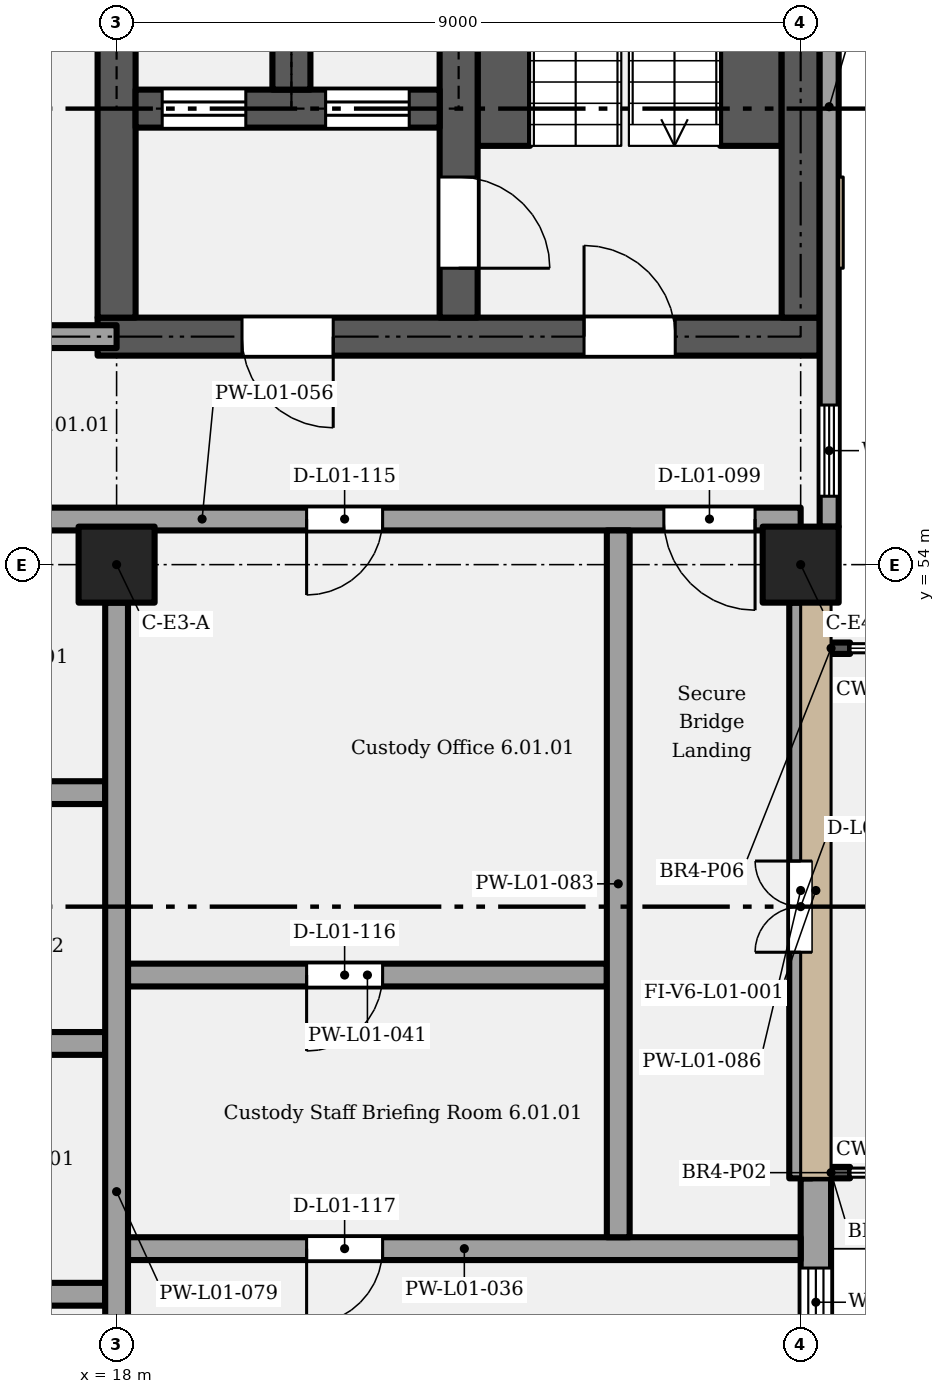
"""IFC4 building model, lengths in metres.
Left out: names, types, materials, properties, quantities, classifications, styles, units other than length and angle.
Written with IfcOpenShell. Run it as: python <this file> out.ifc"""

import sys

from ifc_helpers import new_model, si_unit, direction, frame, frame_2d, origin, origin_2d, place, context, subcontext, project, spatial, rectangle, extrude, element, fill, save


model = new_model("IFC4")
c1 = context("Model", 3, precision=1e-05, world=origin(), true_north=direction((0.0, 1.0)))
c2 = subcontext(c1, "Body", "Model", "MODEL_VIEW")
j1 = project(units=[si_unit("LENGTHUNIT", "METRE"), si_unit("PLANEANGLEUNIT", "RADIAN")], contexts=[c1])
p1 = place(None, origin())
s1 = spatial("IfcSite", under=j1, at=p1, CompositionType="ELEMENT")
p2 = place(p1, origin())
s2 = spatial("IfcBuilding", under=s1, at=p2, CompositionType="ELEMENT")
p3 = place(p2, frame((0.0, 0.0, 6.6)))
s3 = spatial("IfcBuildingStorey", under=s2, at=p3, CompositionType="ELEMENT", Elevation=6.6)
for number, where, z_axis, x_axis in (
    (1, (18.0, 54.0, 0.0), (0.0, 0.0, 1.0), (1.0, 0.0, 0.0)),
    (2, (27.0, 54.0, 0.0), (0.0, 0.0, 1.0), (1.0, 0.0, 0.0)),
):
    element("IfcColumn", number, at=place(p3, frame(where, z_axis=z_axis, x_axis=x_axis)), inside=s3, PredefinedType="COLUMN", context=c2, shape_type="SweptSolid", body=[
        extrude(rectangle(XDim=1.0, YDim=1.0, at=origin_2d()), origin(), (0.0, 0.0, 1.0), 5.4),
    ])
p4 = place(p3, frame((17.75, 57.0, 0.0), z_axis=(0.0, 0.0, 1.0), x_axis=(1.0, 0.0, 0.0)))
e3 = element("IfcWall", 3, at=p4, inside=s3, PredefinedType="SHEAR", context=c2, shape_type="SweptSolid", body=[
    extrude(rectangle(XDim=9.5, YDim=0.5, at=frame_2d((4.75, 0.0))), origin(), (0.0, 0.0, 1.0), 5.1),
])
p5 = place(p4, frame((3.1, 0.0, 0.0), z_axis=(0.0, 0.0, 1.0), x_axis=(-1.0, 0.0, 0.0)))
e4 = element("IfcOpeningElement", 4, at=p5, cuts=e3, PredefinedType="OPENING", context=c2, shape_type="SweptSolid", body=[
    extrude(rectangle(XDim=1.2, YDim=2.1, at=frame_2d((0.6, 1.05))), frame((0.0, 0.26, 0.0), z_axis=(0.0, -1.0, 0.0), x_axis=(1.0, 0.0, 0.0)), (0.0, 0.0, 1.0), 0.52),
])
p6 = place(p4, frame((6.4, 0.0, 0.0)))
e5 = element("IfcOpeningElement", 5, at=p6, cuts=e3, PredefinedType="OPENING", context=c2, shape_type="SweptSolid", body=[
    extrude(rectangle(XDim=1.2, YDim=2.1, at=frame_2d((0.6, 1.05))), frame((0.0, 0.26, 0.0), z_axis=(0.0, -1.0, 0.0), x_axis=(1.0, 0.0, 0.0)), (0.0, 0.0, 1.0), 0.52),
])
p7 = place(p3, frame((18.0, 57.25, 0.0), z_axis=(0.0, 0.0, 1.0), x_axis=(0.0, 1.0, 0.0)))
e6 = element("IfcWall", 6, at=p7, inside=s3, PredefinedType="SHEAR", context=c2, shape_type="SweptSolid", body=[
    extrude(rectangle(XDim=8.3, YDim=0.5, at=frame_2d((4.15, 0.0))), origin(), (0.0, 0.0, 1.0), 5.1),
])
p8 = place(p3, frame((22.5, 57.25, 0.0), z_axis=(0.0, 0.0, 1.0), x_axis=(0.0, 1.0, 0.0)))
e7 = element("IfcWall", 7, at=p8, inside=s3, PredefinedType="SHEAR", context=c2, shape_type="SweptSolid", body=[
    extrude(rectangle(XDim=8.5, YDim=0.5, at=frame_2d((4.25, 0.0))), origin(), (0.0, 0.0, 1.0), 5.1),
])
p9 = place(p8, frame((1.85, 0.0, 0.0), z_axis=(0.0, 0.0, 1.0), x_axis=(-1.0, 0.0, 0.0)))
e8 = element("IfcOpeningElement", 8, at=p9, cuts=e7, PredefinedType="OPENING", context=c2, shape_type="SweptSolid", body=[
    extrude(rectangle(XDim=1.2, YDim=2.1, at=frame_2d((0.6, 1.05))), frame((0.0, 0.26, 0.0), z_axis=(0.0, -1.0, 0.0), x_axis=(1.0, 0.0, 0.0)), (0.0, 0.0, 1.0), 0.52),
])
p10 = place(p3, frame((27.0, 57.25, 0.0), z_axis=(0.0, 0.0, 1.0), x_axis=(0.0, 1.0, 0.0)))
e9 = element("IfcWall", 9, at=p10, inside=s3, PredefinedType="SHEAR", context=c2, shape_type="SweptSolid", body=[
    extrude(rectangle(XDim=8.3, YDim=0.5, at=frame_2d((4.15, 0.0))), origin(), (0.0, 0.0, 1.0), 5.1),
])
p11 = place(p3, frame((18.25, 60.0, 0.0), z_axis=(0.0, 0.0, 1.0), x_axis=(1.0, 0.0, 0.0)))
e10 = element("IfcWall", 10, at=p11, inside=s3, PredefinedType="SHEAR", context=c2, shape_type="SweptSolid", body=[
    extrude(rectangle(XDim=4.0, YDim=0.5, at=frame_2d((2.0, 0.0))), origin(), (0.0, 0.0, 1.0), 5.1),
])
p12 = place(p11, frame((0.35, 0.0, 0.0)))
e11 = element("IfcOpeningElement", 11, at=p12, cuts=e10, PredefinedType="OPENING", context=c2, shape_type="SweptSolid", body=[
    extrude(rectangle(XDim=1.1, YDim=2.1, at=frame_2d((0.55, 1.05))), frame((0.0, 0.26, 0.0), z_axis=(0.0, -1.0, 0.0), x_axis=(1.0, 0.0, 0.0)), (0.0, 0.0, 1.0), 0.52),
])
p13 = place(p11, frame((2.5, 0.0, 0.0)))
e12 = element("IfcOpeningElement", 12, at=p13, cuts=e10, PredefinedType="OPENING", context=c2, shape_type="SweptSolid", body=[
    extrude(rectangle(XDim=1.1, YDim=2.1, at=frame_2d((0.55, 1.05))), frame((0.0, 0.26, 0.0), z_axis=(0.0, -1.0, 0.0), x_axis=(1.0, 0.0, 0.0)), (0.0, 0.0, 1.0), 0.52),
])
p14 = place(p3, frame((20.3, 60.25, 0.0), z_axis=(0.0, 0.0, 1.0), x_axis=(0.0, 1.0, 0.0)))
e13 = element("IfcWall", 13, at=p14, inside=s3, PredefinedType="SHEAR", context=c2, shape_type="SweptSolid", body=[
    extrude(rectangle(XDim=5.5, YDim=0.5, at=frame_2d((2.75, 0.0))), origin(), (0.0, 0.0, 1.0), 5.1),
])
p15 = place(p3, frame((27.2, 38.0, 0.0), z_axis=(0.0, 0.0, 1.0), x_axis=(0.0, 1.0, 0.0)))
e14 = element("IfcWall", 14, at=p15, inside=s3, PredefinedType="SOLIDWALL", context=c2, shape_type="SweptSolid", body=[
    extrude(rectangle(XDim=7.925, YDim=0.4, at=frame_2d((3.962, 0.0))), origin(), (0.0, 0.0, 1.0), 5.1),
])
p16 = place(p15, frame((0.425, 0.0, 1.5)))
e15 = element("IfcOpeningElement", 15, at=p16, cuts=e14, PredefinedType="OPENING", context=c2, shape_type="SweptSolid", body=[
    extrude(rectangle(XDim=0.9, YDim=1.8, at=frame_2d((0.45, 0.9))), frame((0.0, 0.21, 0.0), z_axis=(0.0, -1.0, 0.0), x_axis=(1.0, 0.0, 0.0)), (0.0, 0.0, 1.0), 0.42),
])
p17 = place(p15, frame((3.175, 0.0, 1.5)))
e16 = element("IfcOpeningElement", 16, at=p17, cuts=e14, PredefinedType="OPENING", context=c2, shape_type="SweptSolid", body=[
    extrude(rectangle(XDim=0.9, YDim=1.8, at=frame_2d((0.45, 0.9))), frame((0.0, 0.21, 0.0), z_axis=(0.0, -1.0, 0.0), x_axis=(1.0, 0.0, 0.0)), (0.0, 0.0, 1.0), 0.42),
])
p18 = place(p15, frame((5.845, 0.0, 1.5)))
e17 = element("IfcOpeningElement", 17, at=p18, cuts=e14, PredefinedType="OPENING", context=c2, shape_type="SweptSolid", body=[
    extrude(rectangle(XDim=0.9, YDim=1.8, at=frame_2d((0.45, 0.9))), frame((0.0, 0.21, 0.0), z_axis=(0.0, -1.0, 0.0), x_axis=(1.0, 0.0, 0.0)), (0.0, 0.0, 1.0), 0.42),
])
p19 = place(p3, frame((27.375, 54.5, 0.0), z_axis=(0.0, 0.0, 1.0), x_axis=(0.0, 1.0, 0.0)))
e18 = element("IfcWall", 18, at=p19, inside=s3, PredefinedType="SOLIDWALL", context=c2, shape_type="SweptSolid", body=[
    extrude(rectangle(XDim=11.05, YDim=0.25, at=frame_2d((5.525, 0.0))), origin(), (0.0, 0.0, 1.0), 5.1),
])
p20 = place(p19, frame((0.4, 0.0, 0.9)))
e19 = element("IfcOpeningElement", 19, at=p20, cuts=e18, PredefinedType="OPENING", context=c2, shape_type="SweptSolid", body=[
    extrude(rectangle(XDim=1.2, YDim=2.4, at=frame_2d((0.6, 1.2))), frame((0.0, 0.135, 0.0), z_axis=(0.0, -1.0, 0.0), x_axis=(1.0, 0.0, 0.0)), (0.0, 0.0, 1.0), 0.27),
])
p21 = place(p3, frame((11.55, 44.4, 0.0), z_axis=(0.0, 0.0, 1.0), x_axis=(1.0, 0.0, 0.0)))
e20 = element("IfcWall", 20, at=p21, inside=s3, PredefinedType="PARTITIONING", context=c2, shape_type="SweptSolid", body=[
    extrude(rectangle(XDim=6.3, YDim=0.3, at=frame_2d((3.15, 0.0))), origin(), (0.0, 0.0, 1.0), 5.1),
])
p22 = place(p3, frame((18.15, 45.0, 0.0), z_axis=(0.0, 0.0, 1.0), x_axis=(1.0, 0.0, 0.0)))
e21 = element("IfcWall", 21, at=p22, inside=s3, PredefinedType="PARTITIONING", context=c2, shape_type="SweptSolid", body=[
    extrude(rectangle(XDim=8.85, YDim=0.3, at=frame_2d((4.425, 0.0))), origin(), (0.0, 0.0, 1.0), 5.1),
])
p23 = place(p22, frame((3.35, 0.0, 0.0), z_axis=(0.0, 0.0, 1.0), x_axis=(-1.0, 0.0, 0.0)))
e22 = element("IfcOpeningElement", 22, at=p23, cuts=e21, PredefinedType="OPENING", context=c2, shape_type="SweptSolid", body=[
    extrude(rectangle(XDim=1.0, YDim=2.1, at=frame_2d((0.5, 1.05))), frame((0.0, 0.16, 0.0), z_axis=(0.0, -1.0, 0.0), x_axis=(1.0, 0.0, 0.0)), (0.0, 0.0, 1.0), 0.32),
])
p24 = place(p3, frame((11.55, 47.7, 0.0), z_axis=(0.0, 0.0, 1.0), x_axis=(1.0, 0.0, 0.0)))
e23 = element("IfcWall", 23, at=p24, inside=s3, PredefinedType="PARTITIONING", context=c2, shape_type="SweptSolid", body=[
    extrude(rectangle(XDim=6.3, YDim=0.3, at=frame_2d((3.15, 0.0))), origin(), (0.0, 0.0, 1.0), 5.1),
])
p25 = place(p3, frame((18.15, 48.6, 0.0), z_axis=(0.0, 0.0, 1.0), x_axis=(1.0, 0.0, 0.0)))
e24 = element("IfcWall", 24, at=p25, inside=s3, PredefinedType="PARTITIONING", context=c2, shape_type="SweptSolid", body=[
    extrude(rectangle(XDim=6.3, YDim=0.3, at=frame_2d((3.15, 0.0))), origin(), (0.0, 0.0, 1.0), 5.1),
])
p26 = place(p25, frame((3.35, 0.0, 0.0), z_axis=(0.0, 0.0, 1.0), x_axis=(-1.0, 0.0, 0.0)))
e25 = element("IfcOpeningElement", 25, at=p26, cuts=e24, PredefinedType="OPENING", context=c2, shape_type="SweptSolid", body=[
    extrude(rectangle(XDim=1.0, YDim=2.1, at=frame_2d((0.5, 1.05))), frame((0.0, 0.16, 0.0), z_axis=(0.0, -1.0, 0.0), x_axis=(1.0, 0.0, 0.0)), (0.0, 0.0, 1.0), 0.32),
])
p27 = place(p3, frame((11.55, 51.0, 0.0), z_axis=(0.0, 0.0, 1.0), x_axis=(1.0, 0.0, 0.0)))
e26 = element("IfcWall", 26, at=p27, inside=s3, PredefinedType="PARTITIONING", context=c2, shape_type="SweptSolid", body=[
    extrude(rectangle(XDim=6.3, YDim=0.3, at=frame_2d((3.15, 0.0))), origin(), (0.0, 0.0, 1.0), 5.1),
])
p28 = place(p3, frame((11.25, 54.6, 0.0), z_axis=(0.0, 0.0, 1.0), x_axis=(1.0, 0.0, 0.0)))
e27 = element("IfcWall", 27, at=p28, inside=s3, PredefinedType="PARTITIONING", context=c2, shape_type="SweptSolid", body=[
    extrude(rectangle(XDim=15.75, YDim=0.3, at=frame_2d((7.875, 0.0))), origin(), (0.0, 0.0, 1.0), 5.1),
])
p29 = place(p28, frame((15.15, 0.0, 0.0), z_axis=(0.0, 0.0, 1.0), x_axis=(-1.0, 0.0, 0.0)))
e28 = element("IfcOpeningElement", 28, at=p29, cuts=e27, PredefinedType="OPENING", context=c2, shape_type="SweptSolid", body=[
    extrude(rectangle(XDim=1.2, YDim=2.1, at=frame_2d((0.6, 1.05))), frame((0.0, 0.16, 0.0), z_axis=(0.0, -1.0, 0.0), x_axis=(1.0, 0.0, 0.0)), (0.0, 0.0, 1.0), 0.32),
])
p30 = place(p28, frame((10.25, 0.0, 0.0), z_axis=(0.0, 0.0, 1.0), x_axis=(-1.0, 0.0, 0.0)))
e29 = element("IfcOpeningElement", 29, at=p30, cuts=e27, PredefinedType="OPENING", context=c2, shape_type="SweptSolid", body=[
    extrude(rectangle(XDim=1.0, YDim=2.1, at=frame_2d((0.5, 1.05))), frame((0.0, 0.16, 0.0), z_axis=(0.0, -1.0, 0.0), x_axis=(1.0, 0.0, 0.0)), (0.0, 0.0, 1.0), 0.32),
])
p31 = place(p3, frame((9.0, 57.0, 0.0), z_axis=(0.0, 0.0, 1.0), x_axis=(1.0, 0.0, 0.0)))
e30 = element("IfcWall", 30, at=p31, inside=s3, PredefinedType="PARTITIONING", context=c2, shape_type="SweptSolid", body=[
    extrude(rectangle(XDim=9.0, YDim=0.3, at=frame_2d((4.5, 0.0))), origin(), (0.0, 0.0, 1.0), 5.1),
])
p32 = place(p31, frame((3.9, 0.0, 0.0)))
e31 = element("IfcOpeningElement", 31, at=p32, cuts=e30, PredefinedType="OPENING", context=c2, shape_type="SweptSolid", body=[
    extrude(rectangle(XDim=1.2, YDim=2.1, at=frame_2d((0.6, 1.05))), frame((0.0, 0.16, 0.0), z_axis=(0.0, -1.0, 0.0), x_axis=(1.0, 0.0, 0.0)), (0.0, 0.0, 1.0), 0.32),
])
p33 = place(p3, frame((18.0, 38.0, 0.0), z_axis=(0.0, 0.0, 1.0), x_axis=(0.0, 1.0, 0.0)))
e32 = element("IfcWall", 32, at=p33, inside=s3, PredefinedType="PARTITIONING", context=c2, shape_type="SweptSolid", body=[
    extrude(rectangle(XDim=15.5, YDim=0.3, at=frame_2d((7.75, 0.0))), origin(), (0.0, 0.0, 1.0), 4.15),
])
p34 = place(p3, frame((24.6, 45.15, 0.0), z_axis=(0.0, 0.0, 1.0), x_axis=(0.0, 1.0, 0.0)))
e33 = element("IfcWall", 33, at=p34, inside=s3, PredefinedType="PARTITIONING", context=c2, shape_type="SweptSolid", body=[
    extrude(rectangle(XDim=9.3, YDim=0.3, at=frame_2d((4.65, 0.0))), origin(), (0.0, 0.0, 1.0), 5.1),
])
p35 = place(p3, frame((27.0, 45.925, 0.0), z_axis=(0.0, 0.0, 1.0), x_axis=(0.0, 1.0, 0.0)))
e34 = element("IfcWall", 34, at=p35, inside=s3, PredefinedType="PARTITIONING", context=c2, shape_type="SweptSolid", body=[
    extrude(rectangle(XDim=7.575, YDim=0.3, at=frame_2d((3.788, 0.0))), origin(), (0.0, 0.0, 1.0), 3.3),
])
p36 = place(p35, frame((2.975, 0.0, 0.0)))
e35 = element("IfcOpeningElement", 35, at=p36, cuts=e34, PredefinedType="OPENING", context=c2, shape_type="SweptSolid", body=[
    extrude(rectangle(XDim=1.2, YDim=2.4, at=frame_2d((0.6, 1.2))), frame((0.0, 0.16, 0.0), z_axis=(0.0, -1.0, 0.0), x_axis=(1.0, 0.0, 0.0)), (0.0, 0.0, 1.0), 0.32),
])
p37 = place(p3, frame((23.095, 59.51, 0.0), z_axis=(0.0, 0.0, 1.0), x_axis=(0.0, 1.0, 0.0)))
e36 = element("IfcWall", 36, at=p37, inside=s3, PredefinedType="SHEAR", context=c2, shape_type="SweptSolid", body=[
    extrude(rectangle(XDim=6.24, YDim=0.69, at=frame_2d((3.12, 0.0))), origin(), (0.0, 0.0, 1.0), 2.587),
])
p38 = place(p3, frame((26.345, 59.51, 0.0), z_axis=(0.0, 0.0, 1.0), x_axis=(0.0, 1.0, 0.0)))
e37 = element("IfcWall", 37, at=p38, inside=s3, PredefinedType="SHEAR", context=c2, shape_type="SweptSolid", body=[
    extrude(rectangle(XDim=5.99, YDim=0.81, at=frame_2d((2.995, 0.0))), origin(), (0.0, 0.0, 1.0), 2.587),
])
for number, where, z_axis, x_axis in (
    (38, (27.15, 46.0, 0.0), (0.0, 0.0, 1.0), (1.0, 0.0, 0.0)),
    (39, (27.15, 52.9, 0.0), (0.0, 0.0, 1.0), (1.0, 0.0, 0.0)),
):
    element("IfcWall", number, at=place(p3, frame(where, z_axis=z_axis, x_axis=x_axis)), inside=s3, PredefinedType="SOLIDWALL", context=c2, shape_type="SweptSolid", body=[
        extrude(rectangle(XDim=0.5, YDim=0.15, at=frame_2d((0.25, 0.0))), origin(), (0.0, 0.0, 1.0), 3.3),
    ])
p39 = place(p18, origin())
e40 = element("IfcWindow", 40, at=p39, inside=s3, PartitioningType="SINGLE_PANEL", PredefinedType="WINDOW", context=c2, shape_type="SweptSolid", body=[
    extrude(rectangle(XDim=0.9, YDim=1.8, at=frame_2d((0.45, 0.9))), frame((0.0, 0.03, 0.0), z_axis=(0.0, -1.0, 0.0), x_axis=(1.0, 0.0, 0.0)), (0.0, 0.0, 1.0), 0.06),
])
fill(e17, e40)
p40 = place(p20, origin())
e41 = element("IfcWindow", 41, at=p40, inside=s3, PartitioningType="SINGLE_PANEL", PredefinedType="WINDOW", context=c2, shape_type="SweptSolid", body=[
    extrude(rectangle(XDim=1.2, YDim=2.4, at=frame_2d((0.6, 1.2))), frame((0.0, 0.03, 0.0), z_axis=(0.0, -1.0, 0.0), x_axis=(1.0, 0.0, 0.0)), (0.0, 0.0, 1.0), 0.06),
])
fill(e19, e41)
p41 = place(p36, origin())
e42 = element("IfcDoor", 42, at=p41, inside=s3, OperationType="DOUBLE_DOOR_SINGLE_SWING", PredefinedType="DOOR", context=c2, shape_type="SweptSolid", body=[
    extrude(rectangle(XDim=1.2, YDim=2.4, at=frame_2d((0.6, 1.2))), frame((0.0, 0.025, 0.0), z_axis=(0.0, -1.0, 0.0), x_axis=(1.0, 0.0, 0.0)), (0.0, 0.0, 1.0), 0.05),
])
fill(e35, e42)
p42 = place(p5, origin())
e43 = element("IfcDoor", 43, at=p42, inside=s3, OperationType="SINGLE_SWING_LEFT", PredefinedType="DOOR", context=c2, shape_type="SweptSolid", body=[
    extrude(rectangle(XDim=1.2, YDim=2.1, at=frame_2d((0.6, 1.05))), frame((0.0, 0.025, 0.0), z_axis=(0.0, -1.0, 0.0), x_axis=(1.0, 0.0, 0.0)), (0.0, 0.0, 1.0), 0.05),
])
fill(e4, e43)
p43 = place(p12, origin())
e44 = element("IfcDoor", 44, at=p43, inside=s3, OperationType="SLIDING_TO_LEFT", PredefinedType="DOOR", context=c2, shape_type="SweptSolid", body=[
    extrude(rectangle(XDim=1.1, YDim=2.1, at=frame_2d((0.55, 1.05))), frame((0.0, 0.025, 0.0), z_axis=(0.0, -1.0, 0.0), x_axis=(1.0, 0.0, 0.0)), (0.0, 0.0, 1.0), 0.05),
])
fill(e11, e44)
p44 = place(p13, origin())
e45 = element("IfcDoor", 45, at=p44, inside=s3, OperationType="SLIDING_TO_LEFT", PredefinedType="DOOR", context=c2, shape_type="SweptSolid", body=[
    extrude(rectangle(XDim=1.1, YDim=2.1, at=frame_2d((0.55, 1.05))), frame((0.0, 0.025, 0.0), z_axis=(0.0, -1.0, 0.0), x_axis=(1.0, 0.0, 0.0)), (0.0, 0.0, 1.0), 0.05),
])
fill(e12, e45)
p45 = place(p9, origin())
e46 = element("IfcDoor", 46, at=p45, inside=s3, OperationType="SINGLE_SWING_RIGHT", PredefinedType="DOOR", context=c2, shape_type="SweptSolid", body=[
    extrude(rectangle(XDim=1.2, YDim=2.1, at=frame_2d((0.6, 1.05))), frame((0.0, 0.025, 0.0), z_axis=(0.0, -1.0, 0.0), x_axis=(1.0, 0.0, 0.0)), (0.0, 0.0, 1.0), 0.05),
])
fill(e8, e46)
p46 = place(p6, origin())
e47 = element("IfcDoor", 47, at=p46, inside=s3, OperationType="SINGLE_SWING_LEFT", PredefinedType="DOOR", context=c2, shape_type="SweptSolid", body=[
    extrude(rectangle(XDim=1.2, YDim=2.1, at=frame_2d((0.6, 1.05))), frame((0.0, 0.025, 0.0), z_axis=(0.0, -1.0, 0.0), x_axis=(1.0, 0.0, 0.0)), (0.0, 0.0, 1.0), 0.05),
])
fill(e5, e47)
p47 = place(p29, origin())
e48 = element("IfcDoor", 48, at=p47, inside=s3, OperationType="SINGLE_SWING_LEFT", PredefinedType="DOOR", context=c2, shape_type="SweptSolid", body=[
    extrude(rectangle(XDim=1.2, YDim=2.1, at=frame_2d((0.6, 1.05))), frame((0.0, 0.025, 0.0), z_axis=(0.0, -1.0, 0.0), x_axis=(1.0, 0.0, 0.0)), (0.0, 0.0, 1.0), 0.05),
])
fill(e28, e48)
p48 = place(p30, origin())
e49 = element("IfcDoor", 49, at=p48, inside=s3, OperationType="SINGLE_SWING_RIGHT", PredefinedType="DOOR", context=c2, shape_type="SweptSolid", body=[
    extrude(rectangle(XDim=1.0, YDim=2.1, at=frame_2d((0.5, 1.05))), frame((0.0, 0.025, 0.0), z_axis=(0.0, -1.0, 0.0), x_axis=(1.0, 0.0, 0.0)), (0.0, 0.0, 1.0), 0.05),
])
fill(e29, e49)
p49 = place(p26, origin())
e50 = element("IfcDoor", 50, at=p49, inside=s3, OperationType="SINGLE_SWING_RIGHT", PredefinedType="DOOR", context=c2, shape_type="SweptSolid", body=[
    extrude(rectangle(XDim=1.0, YDim=2.1, at=frame_2d((0.5, 1.05))), frame((0.0, 0.025, 0.0), z_axis=(0.0, -1.0, 0.0), x_axis=(1.0, 0.0, 0.0)), (0.0, 0.0, 1.0), 0.05),
])
fill(e25, e50)
p50 = place(p23, origin())
e51 = element("IfcDoor", 51, at=p50, inside=s3, OperationType="SINGLE_SWING_RIGHT", PredefinedType="DOOR", context=c2, shape_type="SweptSolid", body=[
    extrude(rectangle(XDim=1.0, YDim=2.1, at=frame_2d((0.5, 1.05))), frame((0.0, 0.025, 0.0), z_axis=(0.0, -1.0, 0.0), x_axis=(1.0, 0.0, 0.0)), (0.0, 0.0, 1.0), 0.05),
])
fill(e22, e51)
save(model, sys.argv[1])
